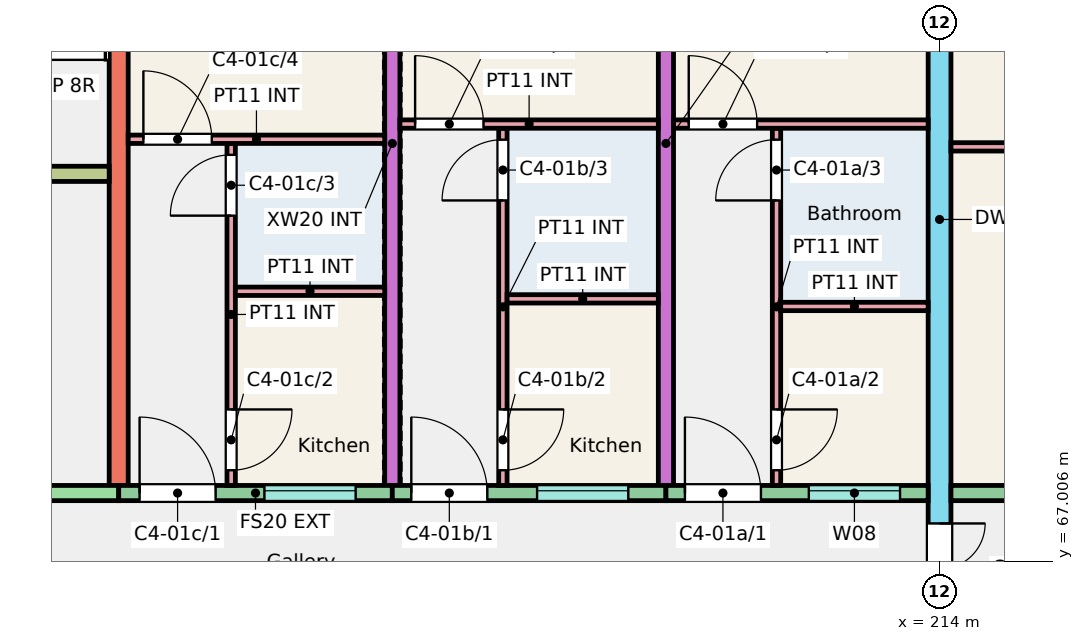
"""IFC4 building model, lengths in metres.
Left out: names, types, materials, properties, quantities, classifications, styles, units other than length and angle.
Written with IfcOpenShell. Run it as: python <this file> out.ifc"""

import sys

from ifc_helpers import new_model, si_unit, direction, frame, frame_2d, origin, place, context, subcontext, project, spatial, rectangle, extrude, element, fill, save


model = new_model("IFC4")
c1 = context("Model", 3, precision=1e-05, world=origin(), true_north=direction((0.0, 1.0)))
c2 = subcontext(c1, "Body", "Model", "MODEL_VIEW")
j1 = project(units=[si_unit("LENGTHUNIT", "METRE"), si_unit("PLANEANGLEUNIT", "RADIAN")], contexts=[c1])
p1 = place(None, origin())
s1 = spatial("IfcSite", under=j1, at=p1, CompositionType="ELEMENT")
p2 = place(p1, origin())
s2 = spatial("IfcBuilding", under=s1, at=p2, CompositionType="ELEMENT")
p3 = place(p2, frame((0.0, 0.0, 3.0)))
s3 = spatial("IfcBuildingStorey", under=s2, at=p3, CompositionType="ELEMENT", Elevation=3.0)
p4 = place(p3, frame((203.2, 68.0, 0.0), z_axis=(0.0, 0.0, 1.0), x_axis=(0.0, 1.0, 0.0)))
e1 = element("IfcWall", 1, at=p4, inside=s3, PredefinedType="SHEAR", context=c2, shape_type="SweptSolid", body=[
    extrude(rectangle(XDim=9.0, YDim=0.25, at=frame_2d((4.5, 0.0))), origin(), (0.0, 0.0, 1.0), 3.0),
])
for number, where, z_axis, x_axis in (
    (2, (206.8, 68.0, 0.0), (0.0, 0.0, 1.0), (0.0, 1.0, 0.0)),
    (3, (210.4, 68.0, 0.0), (0.0, 0.0, 1.0), (0.0, 1.0, 0.0)),
):
    element("IfcWall", number, at=place(p3, frame(where, z_axis=z_axis, x_axis=x_axis)), inside=s3, PredefinedType="SHEAR", context=c2, shape_type="SweptSolid", body=[
        extrude(rectangle(XDim=9.0, YDim=0.2, at=frame_2d((4.5, 0.0))), origin(), (0.0, 0.0, 1.0), 3.0),
    ])
p5 = place(p3, frame((214.0, 66.0, 0.0), z_axis=(0.0, 0.0, 1.0), x_axis=(0.0, 1.0, 0.0)))
e4 = element("IfcWall", 4, at=p5, inside=s3, PredefinedType="SHEAR", context=c2, shape_type="SweptSolid", body=[
    extrude(rectangle(XDim=11.0, YDim=0.3, at=frame_2d((5.5, 0.0))), origin(), (0.0, 0.0, 1.0), 3.0),
])
p6 = place(p5, frame((0.3, 0.0, 0.0)))
e5 = element("IfcOpeningElement", 5, at=p6, cuts=e4, PredefinedType="OPENING", context=c2, shape_type="SweptSolid", body=[
    extrude(rectangle(XDim=1.2, YDim=2.1, at=frame_2d((0.6, 1.05))), frame((0.0, 0.16, 0.0), z_axis=(0.0, -1.0, 0.0), x_axis=(1.0, 0.0, 0.0)), (0.0, 0.0, 1.0), 0.32),
])
p7 = place(p3, frame((197.35, 67.9, 0.0), z_axis=(0.0, 0.0, 1.0), x_axis=(1.0, 0.0, 0.0)))
e6 = element("IfcWall", 6, at=p7, inside=s3, PredefinedType="SHEAR", context=c2, shape_type="SweptSolid", body=[
    extrude(rectangle(XDim=5.85, YDim=0.2, at=frame_2d((2.925, 0.0))), origin(), (0.0, 0.0, 1.0), 3.0),
])
p8 = place(p7, frame((2.312, 0.0, 0.0)))
e7 = element("IfcOpeningElement", 7, at=p8, cuts=e6, PredefinedType="OPENING", context=c2, shape_type="SweptSolid", body=[
    extrude(rectangle(XDim=1.1, YDim=2.1, at=frame_2d((0.55, 1.05))), frame((0.0, 0.11, 0.0), z_axis=(0.0, -1.0, 0.0), x_axis=(1.0, 0.0, 0.0)), (0.0, 0.0, 1.0), 0.22),
])
p9 = place(p3, frame((197.35, 72.1, 0.0), z_axis=(0.0, 0.0, 1.0), x_axis=(1.0, 0.0, 0.0)))
e8 = element("IfcWall", 8, at=p9, inside=s3, PredefinedType="SHEAR", context=c2, shape_type="SweptSolid", body=[
    extrude(rectangle(XDim=5.725, YDim=0.2, at=frame_2d((2.862, 0.0))), origin(), (0.0, 0.0, 1.0), 3.0),
])
p10 = place(p9, frame((3.775, 0.0, 0.0)))
e9 = element("IfcOpeningElement", 9, at=p10, cuts=e8, PredefinedType="OPENING", context=c2, shape_type="SweptSolid", body=[
    extrude(rectangle(XDim=1.0, YDim=2.1, at=frame_2d((0.5, 1.05))), frame((0.0, 0.11, 0.0), z_axis=(0.0, -1.0, 0.0), x_axis=(1.0, 0.0, 0.0)), (0.0, 0.0, 1.0), 0.22),
])
p11 = place(p9, frame((0.762, 0.0, 0.0)))
e10 = element("IfcOpeningElement", 10, at=p11, cuts=e8, PredefinedType="OPENING", context=c2, shape_type="SweptSolid", body=[
    extrude(rectangle(XDim=1.1, YDim=2.1, at=frame_2d((0.55, 1.05))), frame((0.0, 0.11, 0.0), z_axis=(0.0, -1.0, 0.0), x_axis=(1.0, 0.0, 0.0)), (0.0, 0.0, 1.0), 0.22),
])
p12 = place(p3, frame((203.2, 67.9, 0.0), z_axis=(0.0, 0.0, 1.0), x_axis=(1.0, 0.0, 0.0)))
e11 = element("IfcWall", 11, at=p12, inside=s3, PredefinedType="SOLIDWALL", context=c2, shape_type="SweptSolid", body=[
    extrude(rectangle(XDim=3.6, YDim=0.2, at=frame_2d((1.8, 0.0))), origin(), (0.0, 0.0, 1.0), 3.0),
])
p13 = place(p12, frame((1.917, 0.0, 1.1)))
e12 = element("IfcOpeningElement", 12, at=p13, cuts=e11, PredefinedType="OPENING", context=c2, shape_type="SweptSolid", body=[
    extrude(rectangle(XDim=1.2, YDim=1.3, at=frame_2d((0.6, 0.65))), frame((0.0, 0.11, 0.0), z_axis=(0.0, -1.0, 0.0), x_axis=(1.0, 0.0, 0.0)), (0.0, 0.0, 1.0), 0.22),
])
p14 = place(p12, frame((0.275, 0.0, 0.0)))
e13 = element("IfcOpeningElement", 13, at=p14, cuts=e11, PredefinedType="OPENING", context=c2, shape_type="SweptSolid", body=[
    extrude(rectangle(XDim=1.0, YDim=2.1, at=frame_2d((0.5, 1.05))), frame((0.0, 0.11, 0.0), z_axis=(0.0, -1.0, 0.0), x_axis=(1.0, 0.0, 0.0)), (0.0, 0.0, 1.0), 0.22),
])
p15 = place(p3, frame((206.8, 67.9, 0.0), z_axis=(0.0, 0.0, 1.0), x_axis=(1.0, 0.0, 0.0)))
e14 = element("IfcWall", 14, at=p15, inside=s3, PredefinedType="SOLIDWALL", context=c2, shape_type="SweptSolid", body=[
    extrude(rectangle(XDim=3.6, YDim=0.2, at=frame_2d((1.8, 0.0))), origin(), (0.0, 0.0, 1.0), 3.0),
])
p16 = place(p15, frame((1.905, 0.0, 1.1)))
e15 = element("IfcOpeningElement", 15, at=p16, cuts=e14, PredefinedType="OPENING", context=c2, shape_type="SweptSolid", body=[
    extrude(rectangle(XDim=1.2, YDim=1.3, at=frame_2d((0.6, 0.65))), frame((0.0, 0.11, 0.0), z_axis=(0.0, -1.0, 0.0), x_axis=(1.0, 0.0, 0.0)), (0.0, 0.0, 1.0), 0.22),
])
p17 = place(p15, frame((0.25, 0.0, 0.0)))
e16 = element("IfcOpeningElement", 16, at=p17, cuts=e14, PredefinedType="OPENING", context=c2, shape_type="SweptSolid", body=[
    extrude(rectangle(XDim=1.0, YDim=2.1, at=frame_2d((0.5, 1.05))), frame((0.0, 0.11, 0.0), z_axis=(0.0, -1.0, 0.0), x_axis=(1.0, 0.0, 0.0)), (0.0, 0.0, 1.0), 0.22),
])
p18 = place(p3, frame((210.4, 67.9, 0.0), z_axis=(0.0, 0.0, 1.0), x_axis=(1.0, 0.0, 0.0)))
e17 = element("IfcWall", 17, at=p18, inside=s3, PredefinedType="SOLIDWALL", context=c2, shape_type="SweptSolid", body=[
    extrude(rectangle(XDim=3.45, YDim=0.2, at=frame_2d((1.725, 0.0))), origin(), (0.0, 0.0, 1.0), 3.0),
])
p19 = place(p18, frame((1.88, 0.0, 1.1)))
e18 = element("IfcOpeningElement", 18, at=p19, cuts=e17, PredefinedType="OPENING", context=c2, shape_type="SweptSolid", body=[
    extrude(rectangle(XDim=1.2, YDim=1.3, at=frame_2d((0.6, 0.65))), frame((0.0, 0.11, 0.0), z_axis=(0.0, -1.0, 0.0), x_axis=(1.0, 0.0, 0.0)), (0.0, 0.0, 1.0), 0.22),
])
p20 = place(p18, frame((0.25, 0.0, 0.0)))
e19 = element("IfcOpeningElement", 19, at=p20, cuts=e17, PredefinedType="OPENING", context=c2, shape_type="SweptSolid", body=[
    extrude(rectangle(XDim=1.0, YDim=2.1, at=frame_2d((0.5, 1.05))), frame((0.0, 0.11, 0.0), z_axis=(0.0, -1.0, 0.0), x_axis=(1.0, 0.0, 0.0)), (0.0, 0.0, 1.0), 0.22),
])
p21 = place(p3, frame((214.15, 67.9, 0.0), z_axis=(0.0, 0.0, 1.0), x_axis=(1.0, 0.0, 0.0)))
e20 = element("IfcWall", 20, at=p21, inside=s3, PredefinedType="SOLIDWALL", context=c2, shape_type="SweptSolid", body=[
    extrude(rectangle(XDim=3.45, YDim=0.2, at=frame_2d((1.725, 0.0))), origin(), (0.0, 0.0, 1.0), 3.0),
])
p22 = place(p21, frame((0.913, 0.0, 0.9)))
e21 = element("IfcOpeningElement", 21, at=p22, cuts=e20, PredefinedType="OPENING", context=c2, shape_type="SweptSolid", body=[
    extrude(rectangle(XDim=1.5, YDim=1.5, at=frame_2d((0.75, 0.75))), frame((0.0, 0.11, 0.0), z_axis=(0.0, -1.0, 0.0), x_axis=(1.0, 0.0, 0.0)), (0.0, 0.0, 1.0), 0.22),
])
p23 = place(p3, frame((211.855, 68.0, 0.0), z_axis=(0.0, 0.0, 1.0), x_axis=(0.0, 1.0, 0.0)))
e22 = element("IfcWall", 22, at=p23, inside=s3, PredefinedType="PARTITIONING", context=c2, shape_type="SweptSolid", body=[
    extrude(rectangle(XDim=4.7, YDim=0.11, at=frame_2d((2.35, 0.0))), origin(), (0.0, 0.0, 1.0), 2.8),
])
p24 = place(p23, frame((0.2, 0.0, 0.0)))
e23 = element("IfcOpeningElement", 23, at=p24, cuts=e22, PredefinedType="OPENING", context=c2, shape_type="SweptSolid", body=[
    extrude(rectangle(XDim=0.8, YDim=2.1, at=frame_2d((0.4, 1.05))), frame((0.0, 0.065, 0.0), z_axis=(0.0, -1.0, 0.0), x_axis=(1.0, 0.0, 0.0)), (0.0, 0.0, 1.0), 0.13),
])
p25 = place(p23, frame((3.75, 0.0, 0.0)))
e24 = element("IfcOpeningElement", 24, at=p25, cuts=e22, PredefinedType="OPENING", context=c2, shape_type="SweptSolid", body=[
    extrude(rectangle(XDim=0.8, YDim=2.1, at=frame_2d((0.4, 1.05))), frame((0.0, 0.065, 0.0), z_axis=(0.0, -1.0, 0.0), x_axis=(1.0, 0.0, 0.0)), (0.0, 0.0, 1.0), 0.13),
])
p26 = place(p3, frame((211.91, 70.355, 0.0), z_axis=(0.0, 0.0, 1.0), x_axis=(1.0, 0.0, 0.0)))
e25 = element("IfcWall", 25, at=p26, inside=s3, PredefinedType="PARTITIONING", context=c2, shape_type="SweptSolid", body=[
    extrude(rectangle(XDim=1.94, YDim=0.11, at=frame_2d((0.97, 0.0))), origin(), (0.0, 0.0, 1.0), 2.8),
])
p27 = place(p3, frame((210.5, 72.755, 0.0), z_axis=(0.0, 0.0, 1.0), x_axis=(1.0, 0.0, 0.0)))
e26 = element("IfcWall", 26, at=p27, inside=s3, PredefinedType="PARTITIONING", context=c2, shape_type="SweptSolid", body=[
    extrude(rectangle(XDim=3.35, YDim=0.11, at=frame_2d((1.675, 0.0))), origin(), (0.0, 0.0, 1.0), 2.8),
])
p28 = place(p27, frame((0.2, 0.0, 0.0)))
e27 = element("IfcOpeningElement", 27, at=p28, cuts=e26, PredefinedType="OPENING", context=c2, shape_type="SweptSolid", body=[
    extrude(rectangle(XDim=0.9, YDim=2.1, at=frame_2d((0.45, 1.05))), frame((0.0, 0.065, 0.0), z_axis=(0.0, -1.0, 0.0), x_axis=(1.0, 0.0, 0.0)), (0.0, 0.0, 1.0), 0.13),
])
p29 = place(p3, frame((208.255, 68.0, 0.0), z_axis=(0.0, 0.0, 1.0), x_axis=(0.0, 1.0, 0.0)))
e28 = element("IfcWall", 28, at=p29, inside=s3, PredefinedType="PARTITIONING", context=c2, shape_type="SweptSolid", body=[
    extrude(rectangle(XDim=4.7, YDim=0.11, at=frame_2d((2.35, 0.0))), origin(), (0.0, 0.0, 1.0), 2.8),
])
p30 = place(p29, frame((0.2, 0.0, 0.0)))
e29 = element("IfcOpeningElement", 29, at=p30, cuts=e28, PredefinedType="OPENING", context=c2, shape_type="SweptSolid", body=[
    extrude(rectangle(XDim=0.8, YDim=2.1, at=frame_2d((0.4, 1.05))), frame((0.0, 0.065, 0.0), z_axis=(0.0, -1.0, 0.0), x_axis=(1.0, 0.0, 0.0)), (0.0, 0.0, 1.0), 0.13),
])
p31 = place(p29, frame((3.75, 0.0, 0.0)))
e30 = element("IfcOpeningElement", 30, at=p31, cuts=e28, PredefinedType="OPENING", context=c2, shape_type="SweptSolid", body=[
    extrude(rectangle(XDim=0.8, YDim=2.1, at=frame_2d((0.4, 1.05))), frame((0.0, 0.065, 0.0), z_axis=(0.0, -1.0, 0.0), x_axis=(1.0, 0.0, 0.0)), (0.0, 0.0, 1.0), 0.13),
])
p32 = place(p3, frame((208.31, 70.455, 0.0), z_axis=(0.0, 0.0, 1.0), x_axis=(1.0, 0.0, 0.0)))
e31 = element("IfcWall", 31, at=p32, inside=s3, PredefinedType="PARTITIONING", context=c2, shape_type="SweptSolid", body=[
    extrude(rectangle(XDim=1.99, YDim=0.11, at=frame_2d((0.995, 0.0))), origin(), (0.0, 0.0, 1.0), 2.8),
])
p33 = place(p3, frame((206.9, 72.755, 0.0), z_axis=(0.0, 0.0, 1.0), x_axis=(1.0, 0.0, 0.0)))
e32 = element("IfcWall", 32, at=p33, inside=s3, PredefinedType="PARTITIONING", context=c2, shape_type="SweptSolid", body=[
    extrude(rectangle(XDim=3.4, YDim=0.11, at=frame_2d((1.7, 0.0))), origin(), (0.0, 0.0, 1.0), 2.8),
])
p34 = place(p33, frame((0.2, 0.0, 0.0)))
e33 = element("IfcOpeningElement", 33, at=p34, cuts=e32, PredefinedType="OPENING", context=c2, shape_type="SweptSolid", body=[
    extrude(rectangle(XDim=0.9, YDim=2.1, at=frame_2d((0.45, 1.05))), frame((0.0, 0.065, 0.0), z_axis=(0.0, -1.0, 0.0), x_axis=(1.0, 0.0, 0.0)), (0.0, 0.0, 1.0), 0.13),
])
p35 = place(p3, frame((204.68, 68.0, 0.0), z_axis=(0.0, 0.0, 1.0), x_axis=(0.0, 1.0, 0.0)))
e34 = element("IfcWall", 34, at=p35, inside=s3, PredefinedType="PARTITIONING", context=c2, shape_type="SweptSolid", body=[
    extrude(rectangle(XDim=4.5, YDim=0.11, at=frame_2d((2.25, 0.0))), origin(), (0.0, 0.0, 1.0), 2.8),
])
p36 = place(p35, frame((0.2, 0.0, 0.0)))
e35 = element("IfcOpeningElement", 35, at=p36, cuts=e34, PredefinedType="OPENING", context=c2, shape_type="SweptSolid", body=[
    extrude(rectangle(XDim=0.8, YDim=2.1, at=frame_2d((0.4, 1.05))), frame((0.0, 0.065, 0.0), z_axis=(0.0, -1.0, 0.0), x_axis=(1.0, 0.0, 0.0)), (0.0, 0.0, 1.0), 0.13),
])
p37 = place(p35, frame((3.55, 0.0, 0.0)))
e36 = element("IfcOpeningElement", 36, at=p37, cuts=e34, PredefinedType="OPENING", context=c2, shape_type="SweptSolid", body=[
    extrude(rectangle(XDim=0.8, YDim=2.1, at=frame_2d((0.4, 1.05))), frame((0.0, 0.065, 0.0), z_axis=(0.0, -1.0, 0.0), x_axis=(1.0, 0.0, 0.0)), (0.0, 0.0, 1.0), 0.13),
])
p38 = place(p3, frame((204.735, 70.555, 0.0), z_axis=(0.0, 0.0, 1.0), x_axis=(1.0, 0.0, 0.0)))
e37 = element("IfcWall", 37, at=p38, inside=s3, PredefinedType="PARTITIONING", context=c2, shape_type="SweptSolid", body=[
    extrude(rectangle(XDim=1.965, YDim=0.11, at=frame_2d((0.982, 0.0))), origin(), (0.0, 0.0, 1.0), 2.8),
])
p39 = place(p3, frame((203.325, 72.555, 0.0), z_axis=(0.0, 0.0, 1.0), x_axis=(1.0, 0.0, 0.0)))
e38 = element("IfcWall", 38, at=p39, inside=s3, PredefinedType="PARTITIONING", context=c2, shape_type="SweptSolid", body=[
    extrude(rectangle(XDim=3.375, YDim=0.11, at=frame_2d((1.688, 0.0))), origin(), (0.0, 0.0, 1.0), 2.8),
])
p40 = place(p39, frame((0.2, 0.0, 0.0)))
e39 = element("IfcOpeningElement", 39, at=p40, cuts=e38, PredefinedType="OPENING", context=c2, shape_type="SweptSolid", body=[
    extrude(rectangle(XDim=0.9, YDim=2.1, at=frame_2d((0.45, 1.05))), frame((0.0, 0.065, 0.0), z_axis=(0.0, -1.0, 0.0), x_axis=(1.0, 0.0, 0.0)), (0.0, 0.0, 1.0), 0.13),
])
p41 = place(p3, frame((214.15, 72.455, 0.0), z_axis=(0.0, 0.0, 1.0), x_axis=(1.0, 0.0, 0.0)))
e40 = element("IfcWall", 40, at=p41, inside=s3, PredefinedType="PARTITIONING", context=c2, shape_type="SweptSolid", body=[
    extrude(rectangle(XDim=3.325, YDim=0.11, at=frame_2d((1.663, 0.0))), origin(), (0.0, 0.0, 1.0), 2.8),
])
p42 = place(p19, origin())
e41 = element("IfcWindow", 41, at=p42, inside=s3, PartitioningType="SINGLE_PANEL", PredefinedType="WINDOW", context=c2, shape_type="SweptSolid", body=[
    extrude(rectangle(XDim=1.2, YDim=1.3, at=frame_2d((0.6, 0.65))), frame((0.0, 0.06, 0.0), z_axis=(0.0, -1.0, 0.0), x_axis=(1.0, 0.0, 0.0)), (0.0, 0.0, 1.0), 0.06),
])
fill(e18, e41)
p43 = place(p16, origin())
e42 = element("IfcWindow", 42, at=p43, inside=s3, PartitioningType="SINGLE_PANEL", PredefinedType="WINDOW", context=c2, shape_type="SweptSolid", body=[
    extrude(rectangle(XDim=1.2, YDim=1.3, at=frame_2d((0.6, 0.65))), frame((0.0, 0.06, 0.0), z_axis=(0.0, -1.0, 0.0), x_axis=(1.0, 0.0, 0.0)), (0.0, 0.0, 1.0), 0.06),
])
fill(e15, e42)
p44 = place(p13, origin())
e43 = element("IfcWindow", 43, at=p44, inside=s3, PartitioningType="SINGLE_PANEL", PredefinedType="WINDOW", context=c2, shape_type="SweptSolid", body=[
    extrude(rectangle(XDim=1.2, YDim=1.3, at=frame_2d((0.6, 0.65))), frame((0.0, 0.06, 0.0), z_axis=(0.0, -1.0, 0.0), x_axis=(1.0, 0.0, 0.0)), (0.0, 0.0, 1.0), 0.06),
])
fill(e12, e43)
p45 = place(p20, origin())
e44 = element("IfcDoor", 44, at=p45, inside=s3, OperationType="SINGLE_SWING_LEFT", PredefinedType="DOOR", context=c2, shape_type="SweptSolid", body=[
    extrude(rectangle(XDim=1.0, YDim=2.1, at=frame_2d((0.5, 1.05))), frame((0.0, 0.025, 0.0), z_axis=(0.0, -1.0, 0.0), x_axis=(1.0, 0.0, 0.0)), (0.0, 0.0, 1.0), 0.05),
])
fill(e19, e44)
p46 = place(p24, origin())
e45 = element("IfcDoor", 45, at=p46, inside=s3, OperationType="SINGLE_SWING_RIGHT", PredefinedType="DOOR", context=c2, shape_type="SweptSolid", body=[
    extrude(rectangle(XDim=0.8, YDim=2.1, at=frame_2d((0.4, 1.05))), frame((0.0, 0.025, 0.0), z_axis=(0.0, -1.0, 0.0), x_axis=(1.0, 0.0, 0.0)), (0.0, 0.0, 1.0), 0.05),
])
fill(e23, e45)
p47 = place(p25, origin())
e46 = element("IfcDoor", 46, at=p47, inside=s3, OperationType="SINGLE_SWING_LEFT", PredefinedType="DOOR", context=c2, shape_type="SweptSolid", body=[
    extrude(rectangle(XDim=0.8, YDim=2.1, at=frame_2d((0.4, 1.05))), frame((0.0, 0.025, 0.0), z_axis=(0.0, -1.0, 0.0), x_axis=(1.0, 0.0, 0.0)), (0.0, 0.0, 1.0), 0.05),
])
fill(e24, e46)
p48 = place(p28, origin())
e47 = element("IfcDoor", 47, at=p48, inside=s3, OperationType="SINGLE_SWING_LEFT", PredefinedType="DOOR", context=c2, shape_type="SweptSolid", body=[
    extrude(rectangle(XDim=0.9, YDim=2.1, at=frame_2d((0.45, 1.05))), frame((0.0, 0.025, 0.0), z_axis=(0.0, -1.0, 0.0), x_axis=(1.0, 0.0, 0.0)), (0.0, 0.0, 1.0), 0.05),
])
fill(e27, e47)
p49 = place(p17, origin())
e48 = element("IfcDoor", 48, at=p49, inside=s3, OperationType="SINGLE_SWING_LEFT", PredefinedType="DOOR", context=c2, shape_type="SweptSolid", body=[
    extrude(rectangle(XDim=1.0, YDim=2.1, at=frame_2d((0.5, 1.05))), frame((0.0, 0.025, 0.0), z_axis=(0.0, -1.0, 0.0), x_axis=(1.0, 0.0, 0.0)), (0.0, 0.0, 1.0), 0.05),
])
fill(e16, e48)
p50 = place(p30, origin())
e49 = element("IfcDoor", 49, at=p50, inside=s3, OperationType="SINGLE_SWING_RIGHT", PredefinedType="DOOR", context=c2, shape_type="SweptSolid", body=[
    extrude(rectangle(XDim=0.8, YDim=2.1, at=frame_2d((0.4, 1.05))), frame((0.0, 0.025, 0.0), z_axis=(0.0, -1.0, 0.0), x_axis=(1.0, 0.0, 0.0)), (0.0, 0.0, 1.0), 0.05),
])
fill(e29, e49)
p51 = place(p31, origin())
e50 = element("IfcDoor", 50, at=p51, inside=s3, OperationType="SINGLE_SWING_LEFT", PredefinedType="DOOR", context=c2, shape_type="SweptSolid", body=[
    extrude(rectangle(XDim=0.8, YDim=2.1, at=frame_2d((0.4, 1.05))), frame((0.0, 0.025, 0.0), z_axis=(0.0, -1.0, 0.0), x_axis=(1.0, 0.0, 0.0)), (0.0, 0.0, 1.0), 0.05),
])
fill(e30, e50)
p52 = place(p34, origin())
e51 = element("IfcDoor", 51, at=p52, inside=s3, OperationType="SINGLE_SWING_LEFT", PredefinedType="DOOR", context=c2, shape_type="SweptSolid", body=[
    extrude(rectangle(XDim=0.9, YDim=2.1, at=frame_2d((0.45, 1.05))), frame((0.0, 0.025, 0.0), z_axis=(0.0, -1.0, 0.0), x_axis=(1.0, 0.0, 0.0)), (0.0, 0.0, 1.0), 0.05),
])
fill(e33, e51)
p53 = place(p14, origin())
e52 = element("IfcDoor", 52, at=p53, inside=s3, OperationType="SINGLE_SWING_LEFT", PredefinedType="DOOR", context=c2, shape_type="SweptSolid", body=[
    extrude(rectangle(XDim=1.0, YDim=2.1, at=frame_2d((0.5, 1.05))), frame((0.0, 0.025, 0.0), z_axis=(0.0, -1.0, 0.0), x_axis=(1.0, 0.0, 0.0)), (0.0, 0.0, 1.0), 0.05),
])
fill(e13, e52)
p54 = place(p36, origin())
e53 = element("IfcDoor", 53, at=p54, inside=s3, OperationType="SINGLE_SWING_RIGHT", PredefinedType="DOOR", context=c2, shape_type="SweptSolid", body=[
    extrude(rectangle(XDim=0.8, YDim=2.1, at=frame_2d((0.4, 1.05))), frame((0.0, 0.025, 0.0), z_axis=(0.0, -1.0, 0.0), x_axis=(1.0, 0.0, 0.0)), (0.0, 0.0, 1.0), 0.05),
])
fill(e35, e53)
p55 = place(p37, origin())
e54 = element("IfcDoor", 54, at=p55, inside=s3, OperationType="SINGLE_SWING_LEFT", PredefinedType="DOOR", context=c2, shape_type="SweptSolid", body=[
    extrude(rectangle(XDim=0.8, YDim=2.1, at=frame_2d((0.4, 1.05))), frame((0.0, 0.025, 0.0), z_axis=(0.0, -1.0, 0.0), x_axis=(1.0, 0.0, 0.0)), (0.0, 0.0, 1.0), 0.05),
])
fill(e36, e54)
p56 = place(p40, origin())
e55 = element("IfcDoor", 55, at=p56, inside=s3, OperationType="SINGLE_SWING_LEFT", PredefinedType="DOOR", context=c2, shape_type="SweptSolid", body=[
    extrude(rectangle(XDim=0.9, YDim=2.1, at=frame_2d((0.45, 1.05))), frame((0.0, 0.025, 0.0), z_axis=(0.0, -1.0, 0.0), x_axis=(1.0, 0.0, 0.0)), (0.0, 0.0, 1.0), 0.05),
])
fill(e39, e55)
p57 = place(p6, origin())
e56 = element("IfcDoor", 56, at=p57, inside=s3, OperationType="DOUBLE_DOOR_SINGLE_SWING", PredefinedType="DOOR", context=c2, shape_type="SweptSolid", body=[
    extrude(rectangle(XDim=1.2, YDim=2.1, at=frame_2d((0.6, 1.05))), frame((0.0, 0.025, 0.0), z_axis=(0.0, -1.0, 0.0), x_axis=(1.0, 0.0, 0.0)), (0.0, 0.0, 1.0), 0.05),
])
fill(e5, e56)
save(model, sys.argv[1])
